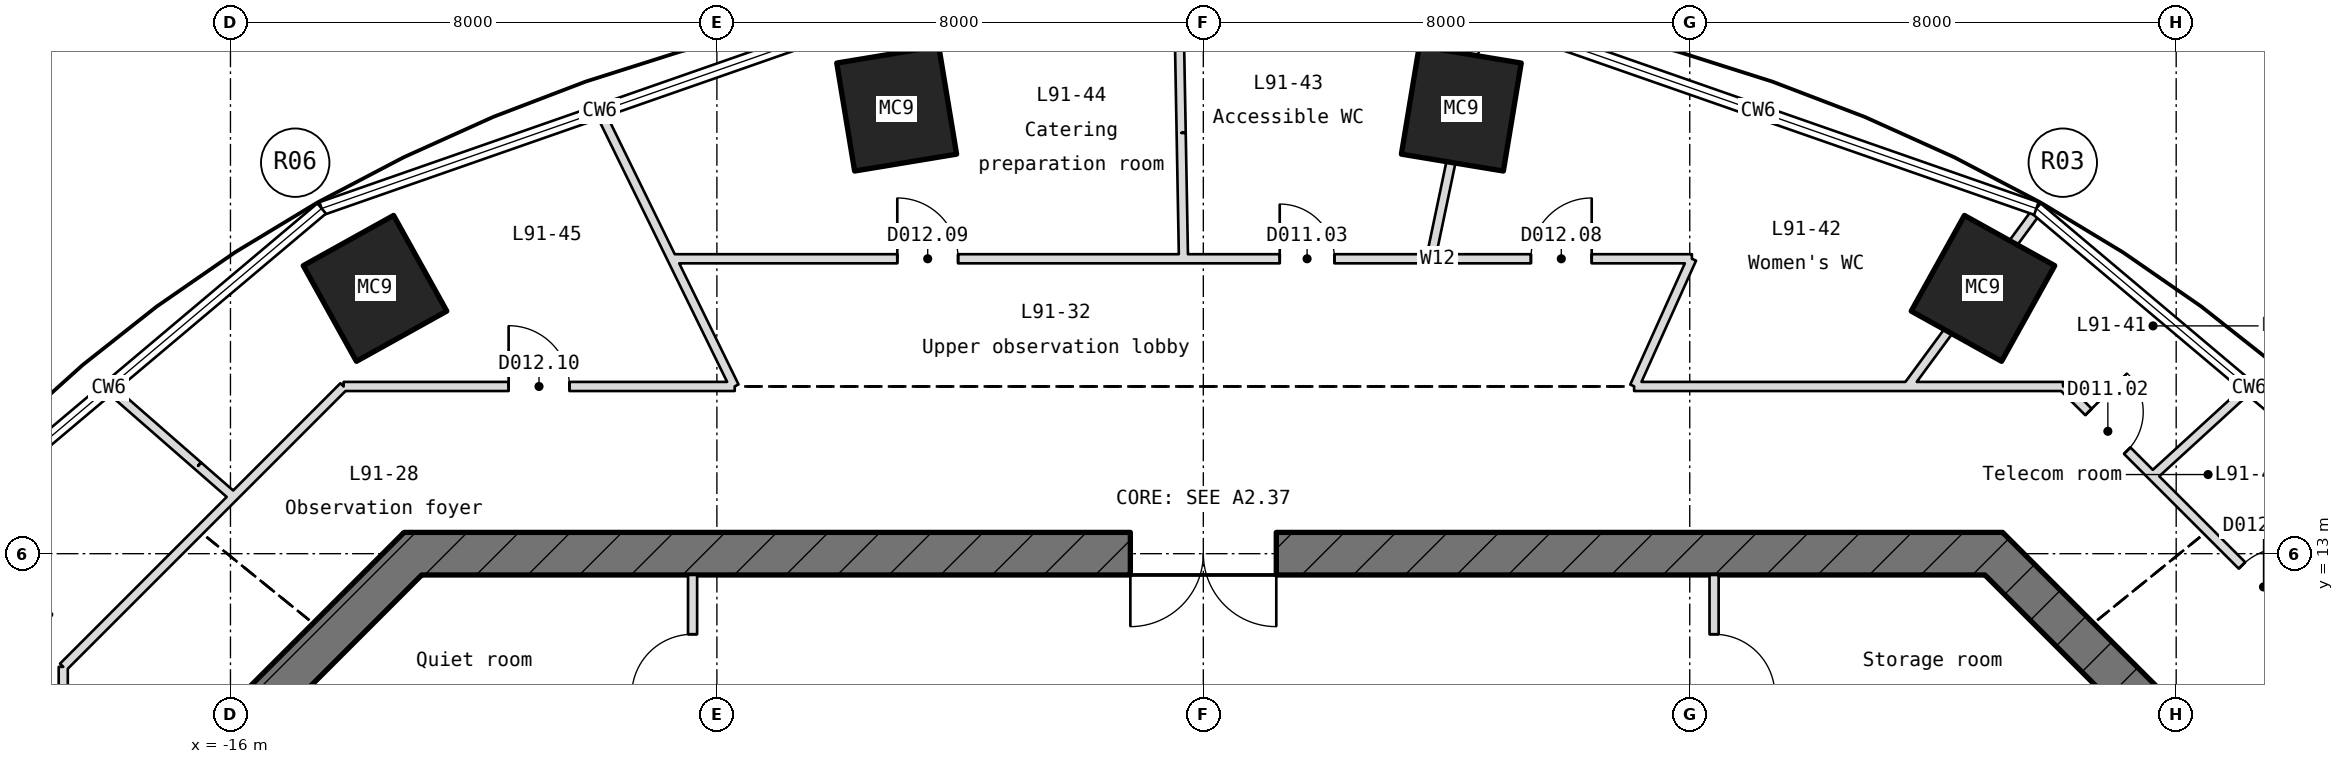
"""IFC4 building model, lengths in metres.
Left out: names, types, materials, properties, quantities, classifications, styles, units other than length and angle.
Written with IfcOpenShell. Run it as: python <this file> out.ifc"""

import sys

from ifc_helpers import new_model, si_unit, direction, frame, frame_2d, origin, origin_2d, place, context, subcontext, project, spatial, rectangle, hollow_rectangle, extrude, element, fill, save


model = new_model("IFC4")
c1 = context("Model", 3, precision=1e-05, world=origin(), true_north=direction((0.0, 1.0)))
c2 = subcontext(c1, "Body", "Model", "MODEL_VIEW")
j1 = project(units=[si_unit("LENGTHUNIT", "METRE"), si_unit("PLANEANGLEUNIT", "RADIAN")], contexts=[c1])
p1 = place(None, origin())
s1 = spatial("IfcSite", under=j1, at=p1, CompositionType="ELEMENT")
p2 = place(p1, origin())
s2 = spatial("IfcBuilding", under=s1, at=p2, CompositionType="ELEMENT")
p3 = place(p2, frame((0.0, 0.0, 401.95)))
s3 = spatial("IfcBuildingStorey", under=s2, at=p3, CompositionType="ELEMENT", Elevation=401.95)
for number, where, z_axis, x_axis in (
    (1, (12.823, 17.363, -0.25), (0.0, 0.0, 1.0), (0.874, -0.486, 0.0)),
    (2, (4.243, 20.32, -0.25), (0.0, 0.0, 1.0), (0.987, -0.163, 0.0)),
    (3, (-5.043, 20.32, -0.25), (0.0, 0.0, 1.0), (0.987, 0.163, 0.0)),
    (4, (-13.623, 17.363, -0.25), (0.0, 0.0, 1.0), (0.874, 0.486, 0.0)),
):
    element("IfcColumn", number, at=place(p3, frame(where, z_axis=z_axis, x_axis=x_axis)), inside=s3, PredefinedType="COLUMN", context=c2, shape_type="SweptSolid", body=[
        extrude(hollow_rectangle(XDim=1.7, YDim=1.8, WallThickness=0.05, at=origin_2d()), origin(), (0.0, 0.0, 1.0), 5.55),
    ])
p4 = place(p3, frame((16.103, 9.897, -0.25), z_axis=(0.0, 0.0, 1.0), x_axis=(-0.707106781187, 0.707106781187, 0.0)))
e5 = element("IfcWall", 5, at=p4, inside=s3, PredefinedType="SHEAR", context=c2, shape_type="SweptSolid", body=[
    extrude(rectangle(XDim=4.533, YDim=0.7, at=frame_2d((2.266, 0.0))), origin(), (0.0, 0.0, 1.0), 5.55),
])
p5 = place(p3, frame((13.145, 13.0, -0.25), z_axis=(0.0, 0.0, 1.0), x_axis=(-1.0, 0.0, 0.0)))
e6 = element("IfcWall", 6, at=p5, inside=s3, PredefinedType="SHEAR", context=c2, shape_type="SweptSolid", body=[
    extrude(rectangle(XDim=26.29, YDim=0.7, at=frame_2d((13.145, 0.0))), origin(), (0.0, 0.0, 1.0), 5.55),
])
p6 = place(p5, frame((11.945, 0.0, 0.25)))
e7 = element("IfcOpeningElement", 7, at=p6, cuts=e6, PredefinedType="OPENING", context=c2, shape_type="SweptSolid", body=[
    extrude(rectangle(XDim=2.4, YDim=2.1, at=frame_2d((1.2, 1.05))), frame((0.0, 0.36, 0.0), z_axis=(0.0, -1.0, 0.0), x_axis=(1.0, 0.0, 0.0)), (0.0, 0.0, 1.0), 0.72),
])
p7 = place(p3, frame((-12.897, 13.103, -0.25), z_axis=(0.0, 0.0, 1.0), x_axis=(-0.707106781187, -0.707106781187, 0.0)))
e8 = element("IfcWall", 8, at=p7, inside=s3, PredefinedType="SHEAR", context=c2, shape_type="SweptSolid", body=[
    extrude(rectangle(XDim=4.533, YDim=0.7, at=frame_2d((2.266, 0.0))), origin(), (0.0, 0.0, 1.0), 5.55),
])
p8 = place(p3, frame((-8.4, 9.7, 0.0), z_axis=(0.0, 0.0, 1.0), x_axis=(0.0, 1.0, 0.0)))
e9 = element("IfcWall", 9, at=p8, inside=s3, PredefinedType="PARTITIONING", context=c2, shape_type="SweptSolid", body=[
    extrude(rectangle(XDim=2.95, YDim=0.15, at=frame_2d((1.475, 0.0))), origin(), (0.0, 0.0, 1.0), 5.3),
])
p9 = place(p8, frame((0.975, 0.0, 0.0)))
e10 = element("IfcOpeningElement", 10, at=p9, cuts=e9, PredefinedType="OPENING", context=c2, shape_type="SweptSolid", body=[
    extrude(rectangle(XDim=1.0, YDim=2.1, at=frame_2d((0.5, 1.05))), frame((0.0, 0.085, 0.0), z_axis=(0.0, -1.0, 0.0), x_axis=(1.0, 0.0, 0.0)), (0.0, 0.0, 1.0), 0.17),
])
p10 = place(p3, frame((8.4, 9.7, 0.0), z_axis=(0.0, 0.0, 1.0), x_axis=(0.0, 1.0, 0.0)))
e11 = element("IfcWall", 11, at=p10, inside=s3, PredefinedType="PARTITIONING", context=c2, shape_type="SweptSolid", body=[
    extrude(rectangle(XDim=2.95, YDim=0.15, at=frame_2d((1.475, 0.0))), origin(), (0.0, 0.0, 1.0), 5.3),
])
p11 = place(p10, frame((0.975, 0.0, 0.0)))
e12 = element("IfcOpeningElement", 12, at=p11, cuts=e11, PredefinedType="OPENING", context=c2, shape_type="SweptSolid", body=[
    extrude(rectangle(XDim=1.0, YDim=2.1, at=frame_2d((0.5, 1.05))), frame((0.0, 0.085, 0.0), z_axis=(0.0, -1.0, 0.0), x_axis=(1.0, 0.0, 0.0)), (0.0, 0.0, 1.0), 0.17),
])
p12 = place(p3, frame((-14.139, 15.75, 0.0), z_axis=(0.0, 0.0, 1.0), x_axis=(1.0, 0.0, 0.0)))
e13 = element("IfcWall", 13, at=p12, inside=s3, PredefinedType="PARTITIONING", context=c2, shape_type="SweptSolid", body=[
    extrude(rectangle(XDim=6.433, YDim=0.15, at=frame_2d((3.216, 0.0))), origin(), (0.0, 0.0, 1.0), 5.3),
])
p13 = place(p12, frame((2.714, 0.0, 0.0)))
e14 = element("IfcOpeningElement", 14, at=p13, cuts=e13, PredefinedType="OPENING", context=c2, shape_type="SweptSolid", body=[
    extrude(rectangle(XDim=1.0, YDim=2.1, at=frame_2d((0.5, 1.05))), frame((0.0, 0.085, 0.0), z_axis=(0.0, -1.0, 0.0), x_axis=(1.0, 0.0, 0.0)), (0.0, 0.0, 1.0), 0.17),
])
p14 = place(p3, frame((-8.74, 17.85, 0.0), z_axis=(0.0, 0.0, 1.0), x_axis=(1.0, 0.0, 0.0)))
e15 = element("IfcWall", 15, at=p14, inside=s3, PredefinedType="PARTITIONING", context=c2, shape_type="SweptSolid", body=[
    extrude(rectangle(XDim=8.418, YDim=0.15, at=frame_2d((4.209, 0.0))), origin(), (0.0, 0.0, 1.0), 5.3),
])
p15 = place(p14, frame((3.707, 0.0, 0.0)))
e16 = element("IfcOpeningElement", 16, at=p15, cuts=e15, PredefinedType="OPENING", context=c2, shape_type="SweptSolid", body=[
    extrude(rectangle(XDim=1.0, YDim=2.1, at=frame_2d((0.5, 1.05))), frame((0.0, 0.085, 0.0), z_axis=(0.0, -1.0, 0.0), x_axis=(1.0, 0.0, 0.0)), (0.0, 0.0, 1.0), 0.17),
])
p16 = place(p3, frame((-18.75, 11.139, 0.0), z_axis=(0.0, 0.0, 1.0), x_axis=(0.707106781187, 0.707106781187, 0.0)))
e17 = element("IfcWall", 17, at=p16, inside=s3, PredefinedType="PARTITIONING", context=c2, shape_type="SweptSolid", body=[
    extrude(rectangle(XDim=6.521, YDim=0.15, at=frame_2d((3.26, 0.0))), origin(), (0.0, 0.0, 1.0), 5.3),
])
p17 = place(p3, frame((-18.75, -11.139, 0.0), z_axis=(0.0, 0.0, 1.0), x_axis=(0.0, 1.0, 0.0)))
e18 = element("IfcWall", 18, at=p17, inside=s3, PredefinedType="PARTITIONING", context=c2, shape_type="SweptSolid", body=[
    extrude(rectangle(XDim=22.278, YDim=0.15, at=frame_2d((11.139, 0.0))), origin(), (0.0, 0.0, 1.0), 5.3),
])
p18 = place(p17, frame((19.785, 0.0, 0.0)))
e19 = element("IfcOpeningElement", 19, at=p18, cuts=e18, PredefinedType="OPENING", context=c2, shape_type="SweptSolid", body=[
    extrude(rectangle(XDim=1.0, YDim=2.1, at=frame_2d((0.5, 1.05))), frame((0.0, 0.085, 0.0), z_axis=(0.0, -1.0, 0.0), x_axis=(1.0, 0.0, 0.0)), (0.0, 0.0, 1.0), 0.17),
])
p19 = place(p17, frame((13.014, 0.0, 0.0)))
e20 = element("IfcOpeningElement", 20, at=p19, cuts=e18, PredefinedType="OPENING", context=c2, shape_type="SweptSolid", body=[
    extrude(rectangle(XDim=1.0, YDim=2.1, at=frame_2d((0.5, 1.05))), frame((0.0, 0.085, 0.0), z_axis=(0.0, -1.0, 0.0), x_axis=(1.0, 0.0, 0.0)), (0.0, 0.0, 1.0), 0.17),
])
p20 = place(p17, frame((6.633, 0.0, 0.0)))
e21 = element("IfcOpeningElement", 21, at=p20, cuts=e18, PredefinedType="OPENING", context=c2, shape_type="SweptSolid", body=[
    extrude(rectangle(XDim=0.9, YDim=2.1, at=frame_2d((0.45, 1.05))), frame((0.0, 0.085, 0.0), z_axis=(0.0, -1.0, 0.0), x_axis=(1.0, 0.0, 0.0)), (0.0, 0.0, 1.0), 0.17),
])
p21 = place(p17, frame((3.013, 0.0, 0.0)))
e22 = element("IfcOpeningElement", 22, at=p21, cuts=e18, PredefinedType="OPENING", context=c2, shape_type="SweptSolid", body=[
    extrude(rectangle(XDim=1.0, YDim=2.1, at=frame_2d((0.5, 1.05))), frame((0.0, 0.085, 0.0), z_axis=(0.0, -1.0, 0.0), x_axis=(1.0, 0.0, 0.0)), (0.0, 0.0, 1.0), 0.17),
])
p22 = place(p3, frame((-7.711, 15.75, 0.0), z_axis=(0.0, 0.0, 1.0), x_axis=(-0.439721633325, 0.89813411314, 0.0)))
e23 = element("IfcWall", 23, at=p22, inside=s3, PredefinedType="PARTITIONING", context=c2, shape_type="SweptSolid", body=[
    extrude(rectangle(XDim=5.016, YDim=0.15, at=frame_2d((2.508, 0.0))), origin(), (0.0, 0.0, 1.0), 5.3),
])
p23 = place(p3, frame((18.75, 11.139, 0.0), z_axis=(0.0, 0.0, 1.0), x_axis=(-0.707106781187, 0.707106781187, 0.0)))
e24 = element("IfcWall", 24, at=p23, inside=s3, PredefinedType="PARTITIONING", context=c2, shape_type="SweptSolid", body=[
    extrude(rectangle(XDim=4.44, YDim=0.15, at=frame_2d((2.22, 0.0))), origin(), (0.0, 0.0, 1.0), 5.3),
])
p24 = place(p23, frame((1.359, 0.0, 0.0)))
e25 = element("IfcOpeningElement", 25, at=p24, cuts=e24, PredefinedType="OPENING", context=c2, shape_type="SweptSolid", body=[
    extrude(rectangle(XDim=1.0, YDim=2.1, at=frame_2d((0.5, 1.05))), frame((0.0, 0.085, 0.0), z_axis=(0.0, -1.0, 0.0), x_axis=(1.0, 0.0, 0.0)), (0.0, 0.0, 1.0), 0.17),
])
p25 = place(p3, frame((-15.952, 13.937, 0.0), z_axis=(0.0, 0.0, 1.0), x_axis=(-0.753047703781, 0.657965923001, 0.0)))
e26 = element("IfcWall", 26, at=p25, inside=s3, PredefinedType="PARTITIONING", context=c2, shape_type="SweptSolid", body=[
    extrude(rectangle(XDim=0.77, YDim=0.15, at=frame_2d((0.385, 0.0))), origin(), (0.0, 0.0, 1.0), 4.99),
])
p26 = place(p3, frame((-16.532, 14.444, 0.0), z_axis=(0.0, 0.0, 1.0), x_axis=(-0.75310908598, 0.657895663928, 0.0)))
e27 = element("IfcWall", 27, at=p26, inside=s3, PredefinedType="PARTITIONING", context=c2, shape_type="SweptSolid", body=[
    extrude(rectangle(XDim=1.931, YDim=0.15, at=frame_2d((0.965, 0.0))), origin(), (0.0, 0.0, 1.0), 5.3),
])
p27 = place(p3, frame((7.085, 15.75, 0.0), z_axis=(0.0, 0.0, 1.0), x_axis=(1.0, 0.0, 0.0)))
e28 = element("IfcWall", 28, at=p27, inside=s3, PredefinedType="PARTITIONING", context=c2, shape_type="SweptSolid", body=[
    extrude(rectangle(XDim=7.054, YDim=0.15, at=frame_2d((3.527, 0.0))), origin(), (0.0, 0.0, 1.0), 5.3),
])
p28 = place(p3, frame((-0.332, 17.85, 0.0), z_axis=(0.0, 0.0, 1.0), x_axis=(1.0, 0.0, 0.0)))
e29 = element("IfcWall", 29, at=p28, inside=s3, PredefinedType="PARTITIONING", context=c2, shape_type="SweptSolid", body=[
    extrude(rectangle(XDim=8.367, YDim=0.15, at=frame_2d((4.183, 0.0))), origin(), (0.0, 0.0, 1.0), 5.3),
])
p29 = place(p28, frame((5.719, 0.0, 0.0)))
e30 = element("IfcOpeningElement", 30, at=p29, cuts=e29, PredefinedType="OPENING", context=c2, shape_type="SweptSolid", body=[
    extrude(rectangle(XDim=1.0, YDim=2.1, at=frame_2d((0.5, 1.05))), frame((0.0, 0.085, 0.0), z_axis=(0.0, -1.0, 0.0), x_axis=(1.0, 0.0, 0.0)), (0.0, 0.0, 1.0), 0.17),
])
p30 = place(p28, frame((1.588, 0.0, 0.0)))
e31 = element("IfcOpeningElement", 31, at=p30, cuts=e29, PredefinedType="OPENING", context=c2, shape_type="SweptSolid", body=[
    extrude(rectangle(XDim=0.9, YDim=2.1, at=frame_2d((0.45, 1.05))), frame((0.0, 0.085, 0.0), z_axis=(0.0, -1.0, 0.0), x_axis=(1.0, 0.0, 0.0)), (0.0, 0.0, 1.0), 0.17),
])
p31 = place(p3, frame((15.614, 14.276, 0.0), z_axis=(0.0, 0.0, 1.0), x_axis=(0.738014143535, 0.674785242831, 0.0)))
e32 = element("IfcWall", 32, at=p31, inside=s3, PredefinedType="PARTITIONING", context=c2, shape_type="SweptSolid", body=[
    extrude(rectangle(XDim=2.131, YDim=0.15, at=frame_2d((1.066, 0.0))), origin(), (0.0, 0.0, 1.0), 5.3),
])
p32 = place(p3, frame((11.585, 15.75, 0.0), z_axis=(0.0, 0.0, 1.0), x_axis=(0.592547779952, 0.805535305542, 0.0)))
e33 = element("IfcWall", 33, at=p32, inside=s3, PredefinedType="PARTITIONING", context=c2, shape_type="SweptSolid", body=[
    extrude(rectangle(XDim=1.126, YDim=0.15, at=frame_2d((0.563, 0.0))), origin(), (0.0, 0.0, 1.0), 4.459),
])
p33 = place(p3, frame((12.252, 16.657, 0.0), z_axis=(0.0, 0.0, 1.0), x_axis=(0.592505845227, 0.805566150836, 0.0)))
e34 = element("IfcWall", 34, at=p33, inside=s3, PredefinedType="PARTITIONING", context=c2, shape_type="SweptSolid", body=[
    extrude(rectangle(XDim=2.464, YDim=0.15, at=frame_2d((1.232, 0.0))), origin(), (0.0, 0.0, 1.0), 5.3),
])
p34 = place(p3, frame((7.09, 15.75, 0.0), z_axis=(0.0, 0.0, 1.0), x_axis=(0.41046164667, 0.911877862772, 0.0)))
e35 = element("IfcWall", 35, at=p34, inside=s3, PredefinedType="PARTITIONING", context=c2, shape_type="SweptSolid", body=[
    extrude(rectangle(XDim=2.303, YDim=0.15, at=frame_2d((1.151, 0.0))), origin(), (0.0, 0.0, 1.0), 5.3),
])
p35 = place(p3, frame((3.74, 17.85, 0.0), z_axis=(0.0, 0.0, 1.0), x_axis=(0.205037817334, 0.978754051569, 0.0)))
e36 = element("IfcWall", 36, at=p35, inside=s3, PredefinedType="PARTITIONING", context=c2, shape_type="SweptSolid", body=[
    extrude(rectangle(XDim=1.619, YDim=0.15, at=frame_2d((0.81, 0.0))), origin(), (0.0, 0.0, 1.0), 4.459),
])
p36 = place(p3, frame((4.072, 19.435, 0.0), z_axis=(0.0, 0.0, 1.0), x_axis=(0.205108906394, 0.978739156526, 0.0)))
e37 = element("IfcWall", 37, at=p36, inside=s3, PredefinedType="PARTITIONING", context=c2, shape_type="SweptSolid", body=[
    extrude(rectangle(XDim=2.457, YDim=0.15, at=frame_2d((1.229, 0.0))), origin(), (0.0, 0.0, 1.0), 5.3),
])
p37 = place(p3, frame((-0.326, 17.85, 0.0), z_axis=(0.0, 0.0, 1.0), x_axis=(-0.018277403929, 0.999832954301, 0.0)))
e38 = element("IfcWall", 38, at=p37, inside=s3, PredefinedType="PARTITIONING", context=c2, shape_type="SweptSolid", body=[
    extrude(rectangle(XDim=2.07, YDim=0.15, at=frame_2d((1.035, 0.0))), origin(), (0.0, 0.0, 1.0), 4.947),
])
p38 = place(p3, frame((-0.364, 19.92, 0.0), z_axis=(0.0, 0.0, 1.0), x_axis=(-0.018349017615, 0.999831642604, 0.0)))
e39 = element("IfcWall", 39, at=p38, inside=s3, PredefinedType="PARTITIONING", context=c2, shape_type="SweptSolid", body=[
    extrude(rectangle(XDim=1.929, YDim=0.15, at=frame_2d((0.965, 0.0))), origin(), (0.0, 0.0, 1.0), 5.3),
])
p39 = place(p3, frame((15.617, 14.272, 0.0), z_axis=(0.0, 0.0, 1.0), x_axis=(-0.707106781187, 0.707106781187, 0.0)))
e40 = element("IfcWall", 40, at=p39, inside=s3, PredefinedType="PARTITIONING", context=c2, shape_type="SweptSolid", body=[
    extrude(rectangle(XDim=2.09, YDim=0.15, at=frame_2d((1.045, 0.0))), origin(), (0.0, 0.0, 1.0), 5.3),
])
p40 = place(p39, frame((0.598, 0.0, 0.0)))
e41 = element("IfcOpeningElement", 41, at=p40, cuts=e40, PredefinedType="OPENING", context=c2, shape_type="SweptSolid", body=[
    extrude(rectangle(XDim=0.9, YDim=2.1, at=frame_2d((0.45, 1.05))), frame((0.0, 0.085, 0.0), z_axis=(0.0, -1.0, 0.0), x_axis=(1.0, 0.0, 0.0)), (0.0, 0.0, 1.0), 0.17),
])
p41 = place(p6, origin())
e42 = element("IfcDoor", 42, at=p41, inside=s3, OperationType="DOUBLE_DOOR_SINGLE_SWING", PredefinedType="DOOR", context=c2, shape_type="SweptSolid", body=[
    extrude(rectangle(XDim=2.4, YDim=2.1, at=frame_2d((1.2, 1.05))), frame((0.0, 0.025, 0.0), z_axis=(0.0, -1.0, 0.0), x_axis=(1.0, 0.0, 0.0)), (0.0, 0.0, 1.0), 0.05),
])
fill(e7, e42)
p42 = place(p9, origin())
e43 = element("IfcDoor", 43, at=p42, inside=s3, OperationType="SINGLE_SWING_RIGHT", PredefinedType="DOOR", context=c2, shape_type="SweptSolid", body=[
    extrude(rectangle(XDim=1.0, YDim=2.1, at=frame_2d((0.5, 1.05))), frame((0.0, 0.025, 0.0), z_axis=(0.0, -1.0, 0.0), x_axis=(1.0, 0.0, 0.0)), (0.0, 0.0, 1.0), 0.05),
])
fill(e10, e43)
p43 = place(p11, frame((1.0, 0.0, 0.0), z_axis=(0.0, 0.0, 1.0), x_axis=(-1.0, 0.0, 0.0)))
e44 = element("IfcDoor", 44, at=p43, inside=s3, OperationType="SINGLE_SWING_LEFT", PredefinedType="DOOR", context=c2, shape_type="SweptSolid", body=[
    extrude(rectangle(XDim=1.0, YDim=2.1, at=frame_2d((0.5, 1.05))), frame((0.0, 0.025, 0.0), z_axis=(0.0, -1.0, 0.0), x_axis=(1.0, 0.0, 0.0)), (0.0, 0.0, 1.0), 0.05),
])
fill(e12, e44)
p44 = place(p24, frame((1.0, 0.0, 0.0), z_axis=(0.0, 0.0, 1.0), x_axis=(-1.0, 0.0, 0.0)))
e45 = element("IfcDoor", 45, at=p44, inside=s3, OperationType="SINGLE_SWING_LEFT", PredefinedType="DOOR", context=c2, shape_type="SweptSolid", body=[
    extrude(rectangle(XDim=1.0, YDim=2.1, at=frame_2d((0.5, 1.05))), frame((0.0, 0.025, 0.0), z_axis=(0.0, -1.0, 0.0), x_axis=(1.0, 0.0, 0.0)), (0.0, 0.0, 1.0), 0.05),
])
fill(e25, e45)
p45 = place(p40, frame((0.9, 0.0, 0.0), z_axis=(0.0, 0.0, 1.0), x_axis=(-1.0, 0.0, 0.0)))
e46 = element("IfcDoor", 46, at=p45, inside=s3, OperationType="SINGLE_SWING_LEFT", PredefinedType="DOOR", context=c2, shape_type="SweptSolid", body=[
    extrude(rectangle(XDim=0.9, YDim=2.1, at=frame_2d((0.45, 1.05))), frame((0.0, 0.025, 0.0), z_axis=(0.0, -1.0, 0.0), x_axis=(1.0, 0.0, 0.0)), (0.0, 0.0, 1.0), 0.05),
])
fill(e41, e46)
p46 = place(p29, origin())
e47 = element("IfcDoor", 47, at=p46, inside=s3, OperationType="SINGLE_SWING_RIGHT", PredefinedType="DOOR", context=c2, shape_type="SweptSolid", body=[
    extrude(rectangle(XDim=1.0, YDim=2.1, at=frame_2d((0.5, 1.05))), frame((0.0, 0.025, 0.0), z_axis=(0.0, -1.0, 0.0), x_axis=(1.0, 0.0, 0.0)), (0.0, 0.0, 1.0), 0.05),
])
fill(e30, e47)
p47 = place(p30, origin())
e48 = element("IfcDoor", 48, at=p47, inside=s3, OperationType="SINGLE_SWING_RIGHT", PredefinedType="DOOR", context=c2, shape_type="SweptSolid", body=[
    extrude(rectangle(XDim=0.9, YDim=2.1, at=frame_2d((0.45, 1.05))), frame((0.0, 0.025, 0.0), z_axis=(0.0, -1.0, 0.0), x_axis=(1.0, 0.0, 0.0)), (0.0, 0.0, 1.0), 0.05),
])
fill(e31, e48)
p48 = place(p15, origin())
e49 = element("IfcDoor", 49, at=p48, inside=s3, OperationType="SINGLE_SWING_RIGHT", PredefinedType="DOOR", context=c2, shape_type="SweptSolid", body=[
    extrude(rectangle(XDim=1.0, YDim=2.1, at=frame_2d((0.5, 1.05))), frame((0.0, 0.025, 0.0), z_axis=(0.0, -1.0, 0.0), x_axis=(1.0, 0.0, 0.0)), (0.0, 0.0, 1.0), 0.05),
])
fill(e16, e49)
p49 = place(p13, origin())
e50 = element("IfcDoor", 50, at=p49, inside=s3, OperationType="SINGLE_SWING_RIGHT", PredefinedType="DOOR", context=c2, shape_type="SweptSolid", body=[
    extrude(rectangle(XDim=1.0, YDim=2.1, at=frame_2d((0.5, 1.05))), frame((0.0, 0.025, 0.0), z_axis=(0.0, -1.0, 0.0), x_axis=(1.0, 0.0, 0.0)), (0.0, 0.0, 1.0), 0.05),
])
fill(e14, e50)
save(model, sys.argv[1])
